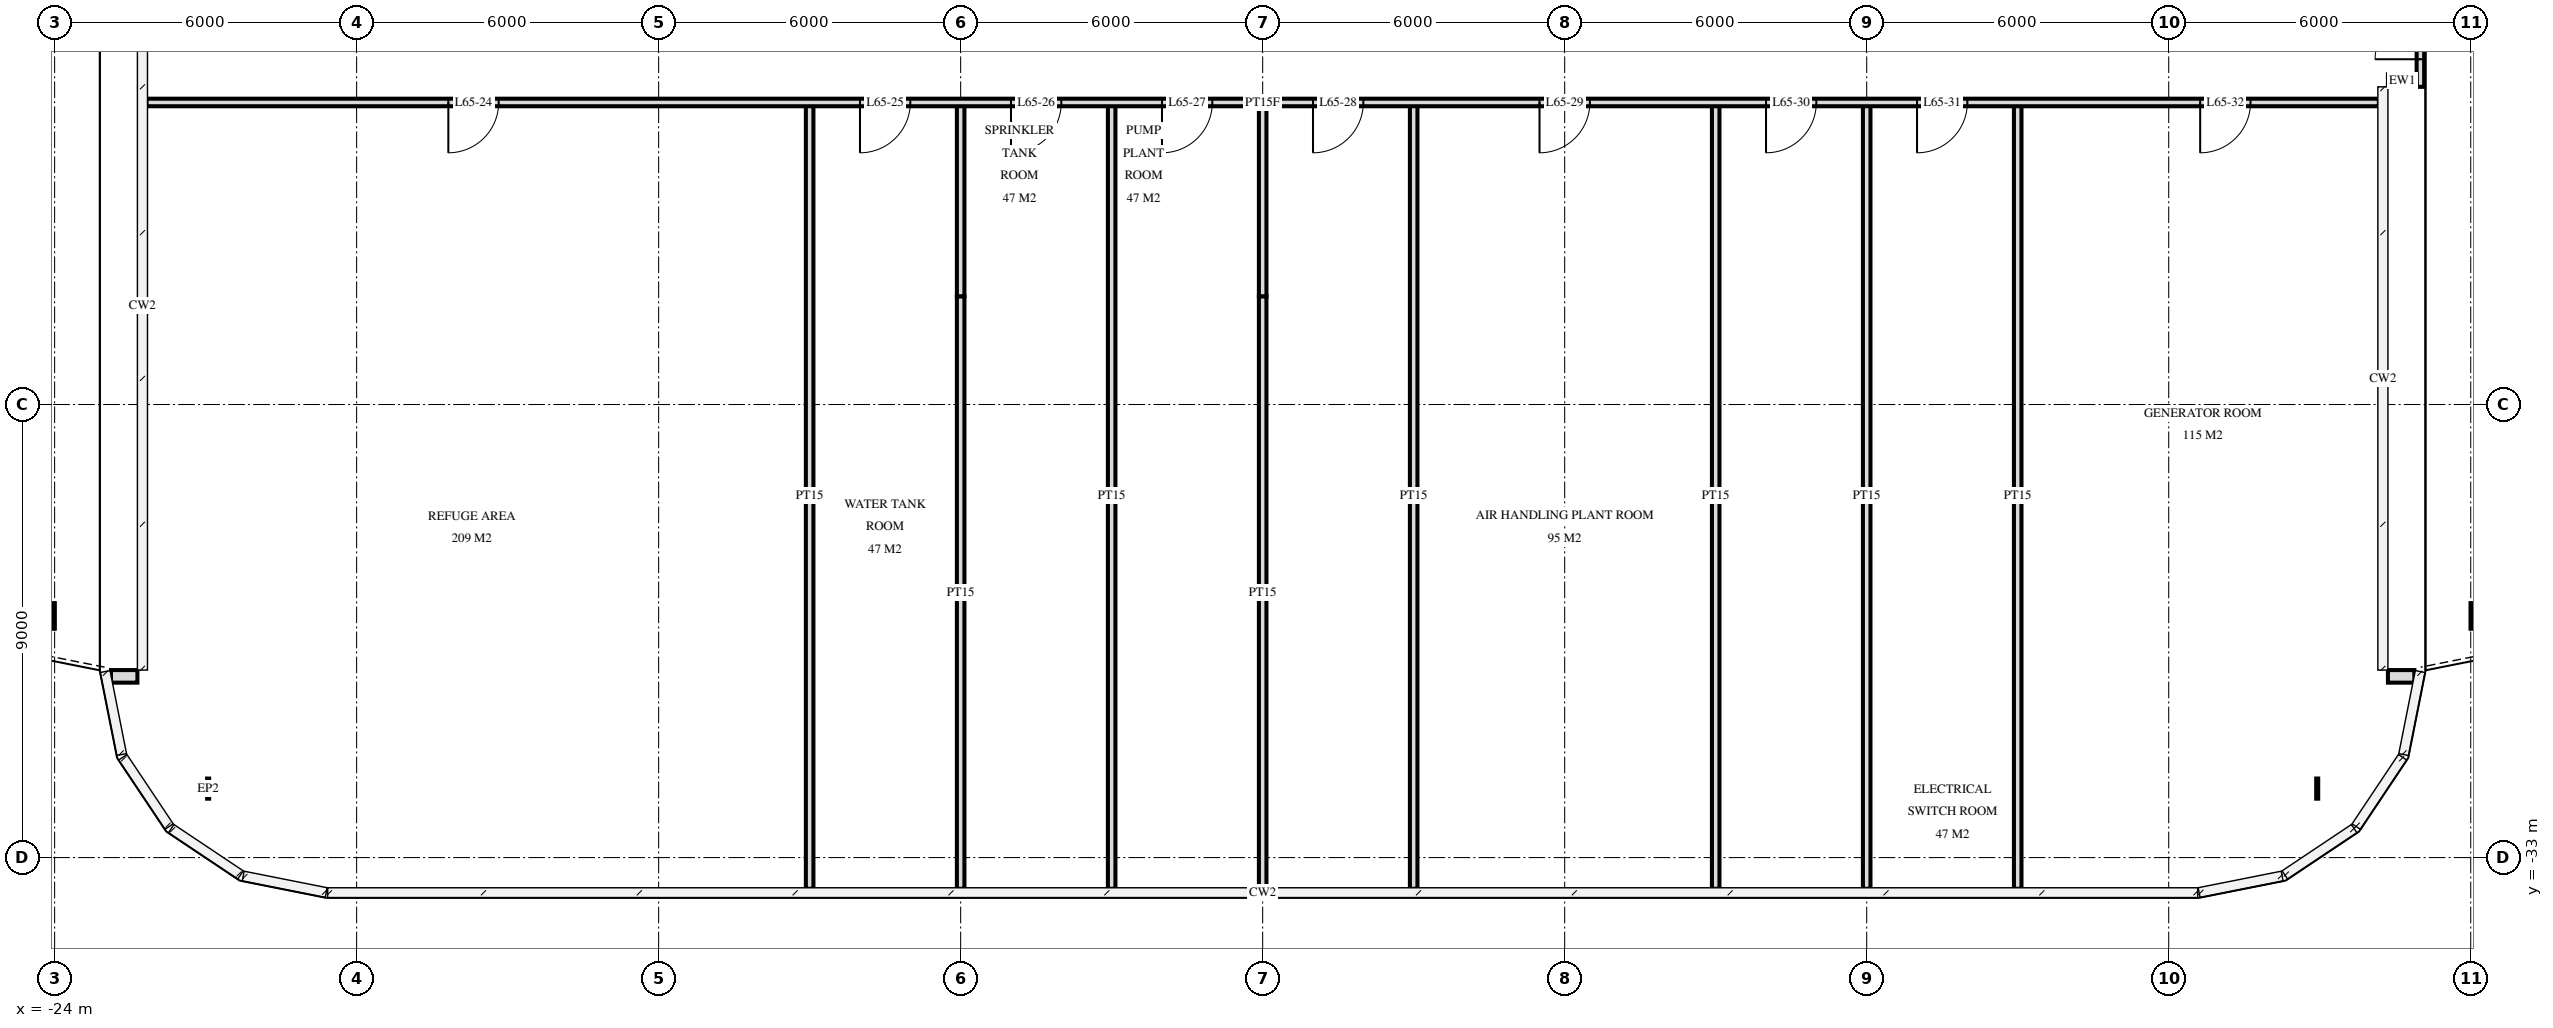
"""IFC4 building model, lengths in metres.
Left out: names, types, materials, properties, quantities, classifications, styles, units other than length and angle.
Written with IfcOpenShell. Run it as: python <this file> out.ifc"""

import sys

from ifc_helpers import new_model, si_unit, direction, frame, frame_2d, origin, place, context, subcontext, project, spatial, rectangle, extrude, element, fill, save


model = new_model("IFC4")
c1 = context("Model", 3, precision=1e-05, world=origin(), true_north=direction((0.0, 1.0)))
c2 = subcontext(c1, "Body", "Model", "MODEL_VIEW")
j1 = project(units=[si_unit("LENGTHUNIT", "METRE"), si_unit("PLANEANGLEUNIT", "RADIAN")], contexts=[c1])
p1 = place(None, origin())
s1 = spatial("IfcSite", under=j1, at=p1, CompositionType="ELEMENT")
p2 = place(p1, origin())
s2 = spatial("IfcBuilding", under=s1, at=p2, CompositionType="ELEMENT")
p3 = place(p2, frame((0.0, 0.0, 246.6)))
s3 = spatial("IfcBuildingStorey", under=s2, at=p3, CompositionType="ELEMENT", Elevation=246.6)
p4 = place(p3, frame((-22.355, -29.4, 0.0), z_axis=(0.0, 0.0, 1.0), x_axis=(-1.0, 0.0, 0.0)))
e1 = element("IfcWall", 1, at=p4, inside=s3, PredefinedType="SOLIDWALL", context=c2, shape_type="SweptSolid", body=[
    extrude(rectangle(XDim=0.525, YDim=0.25, at=frame_2d((0.262, 0.0))), origin(), (0.0, 0.0, 1.0), 5.72),
])
p5 = place(p3, frame((22.355, -17.564, 0.0), z_axis=(0.0, 0.0, 1.0), x_axis=(1.0, 0.0, 0.0)))
e2 = element("IfcWall", 2, at=p5, inside=s3, PredefinedType="SOLIDWALL", context=c2, shape_type="SweptSolid", body=[
    extrude(rectangle(XDim=0.57, YDim=0.25, at=frame_2d((0.285, 0.0))), origin(), (0.0, 0.0, 1.0), 5.72),
])
p6 = place(p3, frame((23.0, -17.689, 0.0), z_axis=(0.0, 0.0, 1.0), x_axis=(0.0, 1.0, 0.0)))
e3 = element("IfcWall", 3, at=p6, inside=s3, PredefinedType="USERDEFINED", context=c2, shape_type="SweptSolid", body=[
    extrude(rectangle(XDim=2.896, YDim=0.15, at=frame_2d((1.448, 0.0))), origin(), (0.0, 0.0, 1.0), 5.72),
])
p7 = place(p6, frame((0.548, 0.0, 0.0)))
e4 = element("IfcOpeningElement", 4, at=p7, cuts=e3, PredefinedType="OPENING", context=c2, shape_type="SweptSolid", body=[
    extrude(rectangle(XDim=1.8, YDim=2.4, at=frame_2d((0.9, 1.2))), frame((0.0, 0.085, 0.0), z_axis=(0.0, -1.0, 0.0), x_axis=(1.0, 0.0, 0.0)), (0.0, 0.0, 1.0), 0.17),
])
p8 = place(p3, frame((22.355, -29.4, 0.0), z_axis=(0.0, 0.0, 1.0), x_axis=(1.0, 0.0, 0.0)))
e5 = element("IfcWall", 5, at=p8, inside=s3, PredefinedType="SOLIDWALL", context=c2, shape_type="SweptSolid", body=[
    extrude(rectangle(XDim=0.525, YDim=0.25, at=frame_2d((0.262, 0.0))), origin(), (0.0, 0.0, 1.0), 5.72),
])
p9 = place(p3, frame((15.0, -33.62, 0.0), z_axis=(0.0, 0.0, 1.0), x_axis=(0.0, 1.0, 0.0)))
e6 = element("IfcWall", 6, at=p9, inside=s3, PredefinedType="PARTITIONING", context=c2, shape_type="SweptSolid", body=[
    extrude(rectangle(XDim=15.62, YDim=0.15, at=frame_2d((7.81, 0.0))), origin(), (0.0, 0.0, 1.0), 5.7),
])
p10 = place(p3, frame((12.0, -33.62, 0.0), z_axis=(0.0, 0.0, 1.0), x_axis=(0.0, 1.0, 0.0)))
e7 = element("IfcWall", 7, at=p10, inside=s3, PredefinedType="PARTITIONING", context=c2, shape_type="SweptSolid", body=[
    extrude(rectangle(XDim=15.62, YDim=0.15, at=frame_2d((7.81, 0.0))), origin(), (0.0, 0.0, 1.0), 4.52),
])
for number, where, z_axis, x_axis in (
    (8, (9.0, -33.62, 0.0), (0.0, 0.0, 1.0), (0.0, 1.0, 0.0)),
    (9, (3.0, -33.62, 0.0), (0.0, 0.0, 1.0), (0.0, 1.0, 0.0)),
):
    element("IfcWall", number, at=place(p3, frame(where, z_axis=z_axis, x_axis=x_axis)), inside=s3, PredefinedType="PARTITIONING", context=c2, shape_type="SweptSolid", body=[
        extrude(rectangle(XDim=15.62, YDim=0.15, at=frame_2d((7.81, 0.0))), origin(), (0.0, 0.0, 1.0), 5.7),
    ])
p11 = place(p3, frame((0.0, -33.62, 0.0), z_axis=(0.0, 0.0, 1.0), x_axis=(0.0, 1.0, 0.0)))
e10 = element("IfcWall", 10, at=p11, inside=s3, PredefinedType="PARTITIONING", context=c2, shape_type="SweptSolid", body=[
    extrude(rectangle(XDim=11.77, YDim=0.15, at=frame_2d((5.885, 0.0))), origin(), (0.0, 0.0, 1.0), 4.52),
])
p12 = place(p3, frame((-3.0, -33.62, 0.0), z_axis=(0.0, 0.0, 1.0), x_axis=(0.0, 1.0, 0.0)))
e11 = element("IfcWall", 11, at=p12, inside=s3, PredefinedType="PARTITIONING", context=c2, shape_type="SweptSolid", body=[
    extrude(rectangle(XDim=15.62, YDim=0.15, at=frame_2d((7.81, 0.0))), origin(), (0.0, 0.0, 1.0), 5.7),
])
p13 = place(p3, frame((-6.0, -33.62, 0.0), z_axis=(0.0, 0.0, 1.0), x_axis=(0.0, 1.0, 0.0)))
e12 = element("IfcWall", 12, at=p13, inside=s3, PredefinedType="PARTITIONING", context=c2, shape_type="SweptSolid", body=[
    extrude(rectangle(XDim=11.77, YDim=0.15, at=frame_2d((5.885, 0.0))), origin(), (0.0, 0.0, 1.0), 4.52),
])
p14 = place(p3, frame((-9.0, -33.62, 0.0), z_axis=(0.0, 0.0, 1.0), x_axis=(0.0, 1.0, 0.0)))
e13 = element("IfcWall", 13, at=p14, inside=s3, PredefinedType="PARTITIONING", context=c2, shape_type="SweptSolid", body=[
    extrude(rectangle(XDim=15.62, YDim=0.15, at=frame_2d((7.81, 0.0))), origin(), (0.0, 0.0, 1.0), 5.7),
])
p15 = place(p3, frame((-22.175, -18.0, 0.0), z_axis=(0.0, 0.0, 1.0), x_axis=(1.0, 0.0, 0.0)))
e14 = element("IfcWall", 14, at=p15, inside=s3, PredefinedType="PARTITIONING", context=c2, shape_type="SweptSolid", body=[
    extrude(rectangle(XDim=44.35, YDim=0.15, at=frame_2d((22.175, 0.0))), origin(), (0.0, 0.0, 1.0), 5.7),
])
p16 = place(p15, frame((5.997, 0.0, 0.0)))
e15 = element("IfcOpeningElement", 15, at=p16, cuts=e14, PredefinedType="OPENING", context=c2, shape_type="SweptSolid", body=[
    extrude(rectangle(XDim=1.0, YDim=2.1, at=frame_2d((0.5, 1.05))), frame((0.0, 0.085, 0.0), z_axis=(0.0, -1.0, 0.0), x_axis=(1.0, 0.0, 0.0)), (0.0, 0.0, 1.0), 0.17),
])
p17 = place(p15, frame((14.175, 0.0, 0.0)))
e16 = element("IfcOpeningElement", 16, at=p17, cuts=e14, PredefinedType="OPENING", context=c2, shape_type="SweptSolid", body=[
    extrude(rectangle(XDim=1.0, YDim=2.1, at=frame_2d((0.5, 1.05))), frame((0.0, 0.085, 0.0), z_axis=(0.0, -1.0, 0.0), x_axis=(1.0, 0.0, 0.0)), (0.0, 0.0, 1.0), 0.17),
])
p18 = place(p15, frame((17.175, 0.0, 0.0)))
e17 = element("IfcOpeningElement", 17, at=p18, cuts=e14, PredefinedType="OPENING", context=c2, shape_type="SweptSolid", body=[
    extrude(rectangle(XDim=1.0, YDim=2.1, at=frame_2d((0.5, 1.05))), frame((0.0, 0.085, 0.0), z_axis=(0.0, -1.0, 0.0), x_axis=(1.0, 0.0, 0.0)), (0.0, 0.0, 1.0), 0.17),
])
p19 = place(p15, frame((20.175, 0.0, 0.0)))
e18 = element("IfcOpeningElement", 18, at=p19, cuts=e14, PredefinedType="OPENING", context=c2, shape_type="SweptSolid", body=[
    extrude(rectangle(XDim=1.0, YDim=2.1, at=frame_2d((0.5, 1.05))), frame((0.0, 0.085, 0.0), z_axis=(0.0, -1.0, 0.0), x_axis=(1.0, 0.0, 0.0)), (0.0, 0.0, 1.0), 0.17),
])
p20 = place(p15, frame((23.175, 0.0, 0.0)))
e19 = element("IfcOpeningElement", 19, at=p20, cuts=e14, PredefinedType="OPENING", context=c2, shape_type="SweptSolid", body=[
    extrude(rectangle(XDim=1.0, YDim=2.1, at=frame_2d((0.5, 1.05))), frame((0.0, 0.085, 0.0), z_axis=(0.0, -1.0, 0.0), x_axis=(1.0, 0.0, 0.0)), (0.0, 0.0, 1.0), 0.17),
])
p21 = place(p15, frame((27.675, 0.0, 0.0)))
e20 = element("IfcOpeningElement", 20, at=p21, cuts=e14, PredefinedType="OPENING", context=c2, shape_type="SweptSolid", body=[
    extrude(rectangle(XDim=1.0, YDim=2.1, at=frame_2d((0.5, 1.05))), frame((0.0, 0.085, 0.0), z_axis=(0.0, -1.0, 0.0), x_axis=(1.0, 0.0, 0.0)), (0.0, 0.0, 1.0), 0.17),
])
p22 = place(p15, frame((32.175, 0.0, 0.0)))
e21 = element("IfcOpeningElement", 21, at=p22, cuts=e14, PredefinedType="OPENING", context=c2, shape_type="SweptSolid", body=[
    extrude(rectangle(XDim=1.0, YDim=2.1, at=frame_2d((0.5, 1.05))), frame((0.0, 0.085, 0.0), z_axis=(0.0, -1.0, 0.0), x_axis=(1.0, 0.0, 0.0)), (0.0, 0.0, 1.0), 0.17),
])
p23 = place(p15, frame((35.175, 0.0, 0.0)))
e22 = element("IfcOpeningElement", 22, at=p23, cuts=e14, PredefinedType="OPENING", context=c2, shape_type="SweptSolid", body=[
    extrude(rectangle(XDim=1.0, YDim=2.1, at=frame_2d((0.5, 1.05))), frame((0.0, 0.085, 0.0), z_axis=(0.0, -1.0, 0.0), x_axis=(1.0, 0.0, 0.0)), (0.0, 0.0, 1.0), 0.17),
])
p24 = place(p15, frame((40.8, 0.0, 0.0)))
e23 = element("IfcOpeningElement", 23, at=p24, cuts=e14, PredefinedType="OPENING", context=c2, shape_type="SweptSolid", body=[
    extrude(rectangle(XDim=1.0, YDim=2.1, at=frame_2d((0.5, 1.05))), frame((0.0, 0.085, 0.0), z_axis=(0.0, -1.0, 0.0), x_axis=(1.0, 0.0, 0.0)), (0.0, 0.0, 1.0), 0.17),
])
for number, where, z_axis, x_axis in (
    (24, (0.0, -21.85, 0.0), (0.0, 0.0, 1.0), (0.0, 1.0, 0.0)),
    (25, (-6.0, -21.85, 0.0), (0.0, 0.0, 1.0), (0.0, 1.0, 0.0)),
):
    element("IfcWall", number, at=place(p3, frame(where, z_axis=z_axis, x_axis=x_axis)), inside=s3, PredefinedType="PARTITIONING", context=c2, shape_type="SweptSolid", body=[
        extrude(rectangle(XDim=3.85, YDim=0.15, at=frame_2d((1.925, 0.0))), origin(), (0.0, 0.0, 1.0), 5.7),
    ])
p25 = place(p7, origin())
e26 = element("IfcDoor", 26, at=p25, inside=s3, OperationType="DOUBLE_DOOR_SINGLE_SWING", PredefinedType="DOOR", context=c2, shape_type="SweptSolid", body=[
    extrude(rectangle(XDim=1.8, YDim=2.4, at=frame_2d((0.9, 1.2))), frame((0.0, 0.025, 0.0), z_axis=(0.0, -1.0, 0.0), x_axis=(1.0, 0.0, 0.0)), (0.0, 0.0, 1.0), 0.05),
])
fill(e4, e26)
p26 = place(p16, frame((0.5, 0.0, 0.0), z_axis=(0.0, 0.0, 1.0), x_axis=(-1.0, 0.0, 0.0)))
e27 = element("IfcDoor", 27, at=p26, inside=s3, OperationType="SINGLE_SWING_LEFT", PredefinedType="DOOR", context=c2, shape_type="SweptSolid", body=[
    extrude(rectangle(XDim=1.0, YDim=2.1, at=frame_2d((0.0, 1.05))), frame((0.0, -0.025, 0.0), z_axis=(0.0, 1.0, 0.0), x_axis=(-1.0, 0.0, 0.0)), (0.0, 0.0, 1.0), 0.05),
])
fill(e15, e27)
p27 = place(p17, frame((0.5, 0.0, 0.0), z_axis=(0.0, 0.0, 1.0), x_axis=(-1.0, 0.0, 0.0)))
e28 = element("IfcDoor", 28, at=p27, inside=s3, OperationType="SINGLE_SWING_LEFT", PredefinedType="DOOR", context=c2, shape_type="SweptSolid", body=[
    extrude(rectangle(XDim=1.0, YDim=2.1, at=frame_2d((0.0, 1.05))), frame((0.0, -0.025, 0.0), z_axis=(0.0, 1.0, 0.0), x_axis=(-1.0, 0.0, 0.0)), (0.0, 0.0, 1.0), 0.05),
])
fill(e16, e28)
p28 = place(p18, frame((0.5, 0.0, 0.0), z_axis=(0.0, 0.0, 1.0), x_axis=(-1.0, 0.0, 0.0)))
e29 = element("IfcDoor", 29, at=p28, inside=s3, OperationType="SINGLE_SWING_LEFT", PredefinedType="DOOR", context=c2, shape_type="SweptSolid", body=[
    extrude(rectangle(XDim=1.0, YDim=2.1, at=frame_2d((0.0, 1.05))), frame((0.0, -0.025, 0.0), z_axis=(0.0, 1.0, 0.0), x_axis=(-1.0, 0.0, 0.0)), (0.0, 0.0, 1.0), 0.05),
])
fill(e17, e29)
p29 = place(p19, frame((0.5, 0.0, 0.0), z_axis=(0.0, 0.0, 1.0), x_axis=(-1.0, 0.0, 0.0)))
e30 = element("IfcDoor", 30, at=p29, inside=s3, OperationType="SINGLE_SWING_LEFT", PredefinedType="DOOR", context=c2, shape_type="SweptSolid", body=[
    extrude(rectangle(XDim=1.0, YDim=2.1, at=frame_2d((0.0, 1.05))), frame((0.0, -0.025, 0.0), z_axis=(0.0, 1.0, 0.0), x_axis=(-1.0, 0.0, 0.0)), (0.0, 0.0, 1.0), 0.05),
])
fill(e18, e30)
p30 = place(p20, frame((0.5, 0.0, 0.0), z_axis=(0.0, 0.0, 1.0), x_axis=(-1.0, 0.0, 0.0)))
e31 = element("IfcDoor", 31, at=p30, inside=s3, OperationType="SINGLE_SWING_LEFT", PredefinedType="DOOR", context=c2, shape_type="SweptSolid", body=[
    extrude(rectangle(XDim=1.0, YDim=2.1, at=frame_2d((0.0, 1.05))), frame((0.0, -0.025, 0.0), z_axis=(0.0, 1.0, 0.0), x_axis=(-1.0, 0.0, 0.0)), (0.0, 0.0, 1.0), 0.05),
])
fill(e19, e31)
p31 = place(p21, frame((0.5, 0.0, 0.0), z_axis=(0.0, 0.0, 1.0), x_axis=(-1.0, 0.0, 0.0)))
e32 = element("IfcDoor", 32, at=p31, inside=s3, OperationType="SINGLE_SWING_LEFT", PredefinedType="DOOR", context=c2, shape_type="SweptSolid", body=[
    extrude(rectangle(XDim=1.0, YDim=2.1, at=frame_2d((0.0, 1.05))), frame((0.0, -0.025, 0.0), z_axis=(0.0, 1.0, 0.0), x_axis=(-1.0, 0.0, 0.0)), (0.0, 0.0, 1.0), 0.05),
])
fill(e20, e32)
p32 = place(p22, frame((0.5, 0.0, 0.0), z_axis=(0.0, 0.0, 1.0), x_axis=(-1.0, 0.0, 0.0)))
e33 = element("IfcDoor", 33, at=p32, inside=s3, OperationType="SINGLE_SWING_LEFT", PredefinedType="DOOR", context=c2, shape_type="SweptSolid", body=[
    extrude(rectangle(XDim=1.0, YDim=2.1, at=frame_2d((0.0, 1.05))), frame((0.0, -0.025, 0.0), z_axis=(0.0, 1.0, 0.0), x_axis=(-1.0, 0.0, 0.0)), (0.0, 0.0, 1.0), 0.05),
])
fill(e21, e33)
p33 = place(p23, frame((0.5, 0.0, 0.0), z_axis=(0.0, 0.0, 1.0), x_axis=(-1.0, 0.0, 0.0)))
e34 = element("IfcDoor", 34, at=p33, inside=s3, OperationType="SINGLE_SWING_LEFT", PredefinedType="DOOR", context=c2, shape_type="SweptSolid", body=[
    extrude(rectangle(XDim=1.0, YDim=2.1, at=frame_2d((0.0, 1.05))), frame((0.0, -0.025, 0.0), z_axis=(0.0, 1.0, 0.0), x_axis=(-1.0, 0.0, 0.0)), (0.0, 0.0, 1.0), 0.05),
])
fill(e22, e34)
p34 = place(p24, frame((0.5, 0.0, 0.0), z_axis=(0.0, 0.0, 1.0), x_axis=(-1.0, 0.0, 0.0)))
e35 = element("IfcDoor", 35, at=p34, inside=s3, OperationType="SINGLE_SWING_LEFT", PredefinedType="DOOR", context=c2, shape_type="SweptSolid", body=[
    extrude(rectangle(XDim=1.0, YDim=2.1, at=frame_2d((0.0, 1.05))), frame((0.0, -0.025, 0.0), z_axis=(0.0, 1.0, 0.0), x_axis=(-1.0, 0.0, 0.0)), (0.0, 0.0, 1.0), 0.05),
])
fill(e23, e35)
save(model, sys.argv[1])
